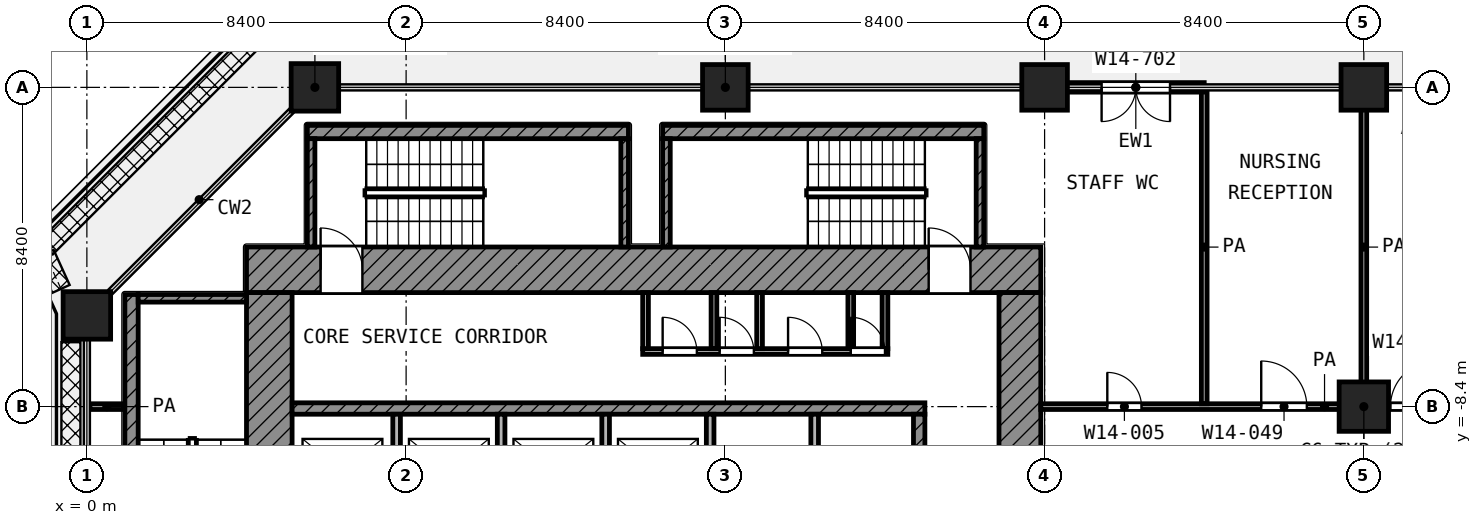
"""IFC4 building model, lengths in metres.
Left out: names, types, materials, properties, quantities, classifications, styles, units other than length and angle.
Written with IfcOpenShell. Run it as: python <this file> out.ifc"""

import sys

from ifc_helpers import new_model, si_unit, direction, frame, frame_2d, origin, origin_2d, place, context, subcontext, project, spatial, rectangle, extrude, element, fill, save


model = new_model("IFC4")
c1 = context("Model", 3, precision=1e-05, world=origin(), true_north=direction((0.0, 1.0)))
c2 = subcontext(c1, "Body", "Model", "MODEL_VIEW")
j1 = project(units=[si_unit("LENGTHUNIT", "METRE"), si_unit("PLANEANGLEUNIT", "RADIAN")], contexts=[c1])
p1 = place(None, origin())
s1 = spatial("IfcSite", under=j1, at=p1, CompositionType="ELEMENT")
p2 = place(p1, origin())
s2 = spatial("IfcBuilding", under=s1, at=p2, CompositionType="ELEMENT")
p3 = place(p2, frame((0.0, 0.0, 64.4)))
s3 = spatial("IfcBuildingStorey", under=s2, at=p3, CompositionType="ELEMENT", Elevation=64.4)
p4 = place(p3, frame((6.0, 0.0, 0.0), z_axis=(0.0, 0.0, 1.0), x_axis=(1.0, 0.0, 0.0)))
e1 = element("IfcColumn", 1, at=p4, inside=s3, PredefinedType="COLUMN", context=c2, shape_type="SweptSolid", body=[
    extrude(rectangle(XDim=1.25, YDim=1.25, at=origin_2d()), origin(), (0.0, 0.0, 1.0), 4.2),
])
for number, where, z_axis, x_axis in (
    (2, (16.8, 0.0, 0.0), (0.0, 0.0, 1.0), (1.0, 0.0, 0.0)),
    (3, (25.2, 0.0, 0.0), (0.0, 0.0, 1.0), (1.0, 0.0, 0.0)),
    (4, (33.6, 0.0, 0.0), (0.0, 0.0, 1.0), (1.0, 0.0, 0.0)),
):
    element("IfcColumn", number, at=place(p3, frame(where, z_axis=z_axis, x_axis=x_axis)), inside=s3, PredefinedType="COLUMN", context=c2, shape_type="SweptSolid", body=[
        extrude(rectangle(XDim=1.2, YDim=1.2, at=origin_2d()), origin(), (0.0, 0.0, 1.0), 4.2),
    ])
p5 = place(p3, frame((0.0, -6.0, 0.0), z_axis=(0.0, 0.0, 1.0), x_axis=(1.0, 0.0, 0.0)))
e5 = element("IfcColumn", 5, at=p5, inside=s3, PredefinedType="COLUMN", context=c2, shape_type="SweptSolid", body=[
    extrude(rectangle(XDim=1.25, YDim=1.25, at=origin_2d()), origin(), (0.0, 0.0, 1.0), 4.2),
])
p6 = place(p3, frame((33.6, -8.4, 0.0), z_axis=(0.0, 0.0, 1.0), x_axis=(1.0, 0.0, 0.0)))
e6 = element("IfcColumn", 6, at=p6, inside=s3, PredefinedType="COLUMN", context=c2, shape_type="SweptSolid", body=[
    extrude(rectangle(XDim=1.3, YDim=1.3, at=origin_2d()), origin(), (0.0, 0.0, 1.0), 4.2),
])
p7 = place(p3, frame((29.4, 0.0, 0.0), z_axis=(0.0, 0.0, 1.0), x_axis=(-1.0, 0.0, 0.0)))
e7 = element("IfcWall", 7, at=p7, inside=s3, PredefinedType="SOLIDWALL", context=c2, shape_type="SweptSolid", body=[
    extrude(rectangle(XDim=3.6, YDim=0.25, at=frame_2d((1.8, 0.0))), origin(), (0.0, 0.0, 1.0), 3.78),
])
p8 = place(p7, frame((0.9, 0.0, 0.0)))
e8 = element("IfcOpeningElement", 8, at=p8, cuts=e7, PredefinedType="OPENING", context=c2, shape_type="SweptSolid", body=[
    extrude(rectangle(XDim=1.8, YDim=2.1, at=frame_2d((0.9, 1.05))), frame((0.0, 0.135, 0.0), z_axis=(0.0, -1.0, 0.0), x_axis=(1.0, 0.0, 0.0)), (0.0, 0.0, 1.0), 0.27),
])
p9 = place(p3, frame((4.2, -4.8, 0.0), z_axis=(0.0, 0.0, 1.0), x_axis=(1.0, 0.0, 0.0)))
e9 = element("IfcWall", 9, at=p9, inside=s3, PredefinedType="SHEAR", context=c2, shape_type="SweptSolid", body=[
    extrude(rectangle(XDim=20.9, YDim=1.2, at=frame_2d((10.45, 0.0))), origin(), (0.0, 0.0, 1.0), 3.9),
])
p10 = place(p9, frame((1.95, 0.0, 0.0)))
e10 = element("IfcOpeningElement", 10, at=p10, cuts=e9, PredefinedType="OPENING", context=c2, shape_type="SweptSolid", body=[
    extrude(rectangle(XDim=1.1, YDim=2.1, at=frame_2d((0.55, 1.05))), frame((0.0, 0.61, 0.0), z_axis=(0.0, -1.0, 0.0), x_axis=(1.0, 0.0, 0.0)), (0.0, 0.0, 1.0), 1.22),
])
p11 = place(p9, frame((17.95, 0.0, 0.0)))
e11 = element("IfcOpeningElement", 11, at=p11, cuts=e9, PredefinedType="OPENING", context=c2, shape_type="SweptSolid", body=[
    extrude(rectangle(XDim=1.1, YDim=2.1, at=frame_2d((0.55, 1.05))), frame((0.0, 0.61, 0.0), z_axis=(0.0, -1.0, 0.0), x_axis=(1.0, 0.0, 0.0)), (0.0, 0.0, 1.0), 1.22),
])
p12 = place(p3, frame((4.8, -25.1, 0.0), z_axis=(0.0, 0.0, 1.0), x_axis=(0.0, 1.0, 0.0)))
e12 = element("IfcWall", 12, at=p12, inside=s3, PredefinedType="SHEAR", context=c2, shape_type="SweptSolid", body=[
    extrude(rectangle(XDim=19.7, YDim=1.2, at=frame_2d((9.85, 0.0))), origin(), (0.0, 0.0, 1.0), 3.9),
])
p13 = place(p12, frame((11.55, 0.0, 0.0)))
e13 = element("IfcOpeningElement", 13, at=p13, cuts=e12, PredefinedType="OPENING", context=c2, shape_type="SweptSolid", body=[
    extrude(rectangle(XDim=1.1, YDim=2.1, at=frame_2d((0.55, 1.05))), frame((0.0, 0.61, 0.0), z_axis=(0.0, -1.0, 0.0), x_axis=(1.0, 0.0, 0.0)), (0.0, 0.0, 1.0), 1.22),
])
p14 = place(p12, frame((2.25, 0.0, 0.0)))
e14 = element("IfcOpeningElement", 14, at=p14, cuts=e12, PredefinedType="OPENING", context=c2, shape_type="SweptSolid", body=[
    extrude(rectangle(XDim=1.1, YDim=2.1, at=frame_2d((0.55, 1.05))), frame((0.0, 0.61, 0.0), z_axis=(0.0, -1.0, 0.0), x_axis=(1.0, 0.0, 0.0)), (0.0, 0.0, 1.0), 1.22),
])
p15 = place(p3, frame((24.55, -24.0, 0.0), z_axis=(0.0, 0.0, 1.0), x_axis=(0.0, 1.0, 0.0)))
e15 = element("IfcWall", 15, at=p15, inside=s3, PredefinedType="SHEAR", context=c2, shape_type="SweptSolid", body=[
    extrude(rectangle(XDim=18.6, YDim=1.1, at=frame_2d((9.3, 0.0))), origin(), (0.0, 0.0, 1.0), 3.9),
])
p16 = place(p15, frame((10.5, 0.0, 0.0)))
e16 = element("IfcOpeningElement", 16, at=p16, cuts=e15, PredefinedType="OPENING", context=c2, shape_type="SweptSolid", body=[
    extrude(rectangle(XDim=1.8, YDim=2.1, at=frame_2d((0.9, 1.05))), frame((0.0, 0.56, 0.0), z_axis=(0.0, -1.0, 0.0), x_axis=(1.0, 0.0, 0.0)), (0.0, 0.0, 1.0), 1.12),
])
p17 = place(p3, frame((5.4, -8.45, 0.0), z_axis=(0.0, 0.0, 1.0), x_axis=(1.0, 0.0, 0.0)))
e17 = element("IfcWall", 17, at=p17, inside=s3, PredefinedType="SHEAR", context=c2, shape_type="SweptSolid", body=[
    extrude(rectangle(XDim=16.65, YDim=0.3, at=frame_2d((8.325, 0.0))), origin(), (0.0, 0.0, 1.0), 3.9),
])
p18 = place(p3, frame((21.9, -10.95, 0.0), z_axis=(0.0, 0.0, 1.0), x_axis=(0.0, 1.0, 0.0)))
e18 = element("IfcWall", 18, at=p18, inside=s3, PredefinedType="SHEAR", context=c2, shape_type="SweptSolid", body=[
    extrude(rectangle(XDim=2.35, YDim=0.3, at=frame_2d((1.175, 0.0))), origin(), (0.0, 0.0, 1.0), 3.9),
])
for number, where, z_axis, x_axis in (
    (19, (8.15, -10.95, 0.0), (0.0, 0.0, 1.0), (0.0, 1.0, 0.0)),
    (20, (10.9, -10.95, 0.0), (0.0, 0.0, 1.0), (0.0, 1.0, 0.0)),
    (21, (13.65, -10.95, 0.0), (0.0, 0.0, 1.0), (0.0, 1.0, 0.0)),
    (22, (16.4, -10.95, 0.0), (0.0, 0.0, 1.0), (0.0, 1.0, 0.0)),
    (23, (19.15, -10.95, 0.0), (0.0, 0.0, 1.0), (0.0, 1.0, 0.0)),
):
    element("IfcWall", number, at=place(p3, frame(where, z_axis=z_axis, x_axis=x_axis)), inside=s3, PredefinedType="PARTITIONING", context=c2, shape_type="SweptSolid", body=[
        extrude(rectangle(XDim=2.35, YDim=0.2, at=frame_2d((1.175, 0.0))), origin(), (0.0, 0.0, 1.0), 3.9),
    ])
p19 = place(p3, frame((14.625, -6.95, 0.0), z_axis=(0.0, 0.0, 1.0), x_axis=(1.0, 0.0, 0.0)))
e24 = element("IfcWall", 24, at=p19, inside=s3, PredefinedType="PARTITIONING", context=c2, shape_type="SweptSolid", body=[
    extrude(rectangle(XDim=6.45, YDim=0.15, at=frame_2d((3.225, 0.0))), origin(), (0.0, 0.0, 1.0), 3.9),
])
p20 = place(p19, frame((0.525, 0.0, 0.0)))
e25 = element("IfcOpeningElement", 25, at=p20, cuts=e24, PredefinedType="OPENING", context=c2, shape_type="SweptSolid", body=[
    extrude(rectangle(XDim=0.9, YDim=2.1, at=frame_2d((0.45, 1.05))), frame((0.0, 0.085, 0.0), z_axis=(0.0, -1.0, 0.0), x_axis=(1.0, 0.0, 0.0)), (0.0, 0.0, 1.0), 0.17),
])
p21 = place(p19, frame((2.025, 0.0, 0.0)))
e26 = element("IfcOpeningElement", 26, at=p21, cuts=e24, PredefinedType="OPENING", context=c2, shape_type="SweptSolid", body=[
    extrude(rectangle(XDim=0.9, YDim=2.1, at=frame_2d((0.45, 1.05))), frame((0.0, 0.085, 0.0), z_axis=(0.0, -1.0, 0.0), x_axis=(1.0, 0.0, 0.0)), (0.0, 0.0, 1.0), 0.17),
])
p22 = place(p19, frame((3.825, 0.0, 0.0)))
e27 = element("IfcOpeningElement", 27, at=p22, cuts=e24, PredefinedType="OPENING", context=c2, shape_type="SweptSolid", body=[
    extrude(rectangle(XDim=0.9, YDim=2.1, at=frame_2d((0.45, 1.05))), frame((0.0, 0.085, 0.0), z_axis=(0.0, -1.0, 0.0), x_axis=(1.0, 0.0, 0.0)), (0.0, 0.0, 1.0), 0.17),
])
p23 = place(p19, frame((5.475, 0.0, 0.0)))
e28 = element("IfcOpeningElement", 28, at=p23, cuts=e24, PredefinedType="OPENING", context=c2, shape_type="SweptSolid", body=[
    extrude(rectangle(XDim=0.9, YDim=2.1, at=frame_2d((0.45, 1.05))), frame((0.0, 0.085, 0.0), z_axis=(0.0, -1.0, 0.0), x_axis=(1.0, 0.0, 0.0)), (0.0, 0.0, 1.0), 0.17),
])
for number, where, z_axis, x_axis in (
    (29, (14.7, -6.875, 0.0), (0.0, 0.0, 1.0), (0.0, 1.0, 0.0)),
    (30, (16.5, -6.875, 0.0), (0.0, 0.0, 1.0), (0.0, 1.0, 0.0)),
    (31, (17.7, -6.875, 0.0), (0.0, 0.0, 1.0), (0.0, 1.0, 0.0)),
    (32, (20.1, -6.875, 0.0), (0.0, 0.0, 1.0), (0.0, 1.0, 0.0)),
    (33, (21.0, -6.875, 0.0), (0.0, 0.0, 1.0), (0.0, 1.0, 0.0)),
):
    element("IfcWall", number, at=place(p3, frame(where, z_axis=z_axis, x_axis=x_axis)), inside=s3, PredefinedType="PARTITIONING", context=c2, shape_type="SweptSolid", body=[
        extrude(rectangle(XDim=1.475, YDim=0.15, at=frame_2d((0.738, 0.0))), origin(), (0.0, 0.0, 1.0), 3.9),
    ])
p24 = place(p3, frame((1.175, -13.9, 0.0), z_axis=(0.0, 0.0, 1.0), x_axis=(0.0, 1.0, 0.0)))
e34 = element("IfcWall", 34, at=p24, inside=s3, PredefinedType="SHEAR", context=c2, shape_type="SweptSolid", body=[
    extrude(rectangle(XDim=8.45, YDim=0.35, at=frame_2d((4.225, 0.0))), origin(), (0.0, 0.0, 1.0), 3.9),
])
p25 = place(p3, frame((1.35, -5.55, 0.0), z_axis=(0.0, 0.0, 1.0), x_axis=(1.0, 0.0, 0.0)))
e35 = element("IfcWall", 35, at=p25, inside=s3, PredefinedType="SHEAR", context=c2, shape_type="SweptSolid", body=[
    extrude(rectangle(XDim=2.85, YDim=0.2, at=frame_2d((1.425, 0.0))), origin(), (0.0, 0.0, 1.0), 3.9),
])
p26 = place(p3, frame((5.8, -1.175, 0.0), z_axis=(0.0, 0.0, 1.0), x_axis=(1.0, 0.0, 0.0)))
e36 = element("IfcWall", 36, at=p26, inside=s3, PredefinedType="SHEAR", context=c2, shape_type="SweptSolid", body=[
    extrude(rectangle(XDim=8.45, YDim=0.35, at=frame_2d((4.225, 0.0))), origin(), (0.0, 0.0, 1.0), 3.9),
])
for number, where, z_axis, x_axis in (
    (37, (5.9, -4.2, 0.0), (0.0, 0.0, 1.0), (0.0, 1.0, 0.0)),
    (38, (14.15, -4.2, 0.0), (0.0, 0.0, 1.0), (0.0, 1.0, 0.0)),
):
    element("IfcWall", number, at=place(p3, frame(where, z_axis=z_axis, x_axis=x_axis)), inside=s3, PredefinedType="SHEAR", context=c2, shape_type="SweptSolid", body=[
        extrude(rectangle(XDim=2.85, YDim=0.2, at=frame_2d((1.425, 0.0))), origin(), (0.0, 0.0, 1.0), 3.9),
    ])
p27 = place(p3, frame((15.15, -1.175, 0.0), z_axis=(0.0, 0.0, 1.0), x_axis=(1.0, 0.0, 0.0)))
e39 = element("IfcWall", 39, at=p27, inside=s3, PredefinedType="SHEAR", context=c2, shape_type="SweptSolid", body=[
    extrude(rectangle(XDim=8.45, YDim=0.35, at=frame_2d((4.225, 0.0))), origin(), (0.0, 0.0, 1.0), 3.9),
])
for number, where, z_axis, x_axis in (
    (40, (15.25, -4.2, 0.0), (0.0, 0.0, 1.0), (0.0, 1.0, 0.0)),
    (41, (23.5, -4.2, 0.0), (0.0, 0.0, 1.0), (0.0, 1.0, 0.0)),
):
    element("IfcWall", number, at=place(p3, frame(where, z_axis=z_axis, x_axis=x_axis)), inside=s3, PredefinedType="SHEAR", context=c2, shape_type="SweptSolid", body=[
        extrude(rectangle(XDim=2.85, YDim=0.2, at=frame_2d((1.425, 0.0))), origin(), (0.0, 0.0, 1.0), 3.9),
    ])
p28 = place(p3, frame((0.08, -8.4, 0.0), z_axis=(0.0, 0.0, 1.0), x_axis=(1.0, 0.0, 0.0)))
e42 = element("IfcWall", 42, at=p28, inside=s3, PredefinedType="PARTITIONING", context=c2, shape_type="SweptSolid", body=[
    extrude(rectangle(XDim=0.89, YDim=0.15, at=frame_2d((0.445, 0.0))), origin(), (0.0, 0.0, 1.0), 3.9),
])
p29 = place(p3, frame((25.1, -8.4, 0.0), z_axis=(0.0, 0.0, 1.0), x_axis=(1.0, 0.0, 0.0)))
e43 = element("IfcWall", 43, at=p29, inside=s3, PredefinedType="PARTITIONING", context=c2, shape_type="SweptSolid", body=[
    extrude(rectangle(XDim=14.932, YDim=0.15, at=frame_2d((7.466, 0.0))), origin(), (0.0, 0.0, 1.0), 3.9),
])
p30 = place(p29, frame((1.75, 0.0, 0.0)))
e44 = element("IfcOpeningElement", 44, at=p30, cuts=e43, PredefinedType="OPENING", context=c2, shape_type="SweptSolid", body=[
    extrude(rectangle(XDim=0.9, YDim=2.1, at=frame_2d((0.45, 1.05))), frame((0.0, 0.085, 0.0), z_axis=(0.0, -1.0, 0.0), x_axis=(1.0, 0.0, 0.0)), (0.0, 0.0, 1.0), 0.17),
])
p31 = place(p29, frame((5.8, 0.0, 0.0)))
e45 = element("IfcOpeningElement", 45, at=p31, cuts=e43, PredefinedType="OPENING", context=c2, shape_type="SweptSolid", body=[
    extrude(rectangle(XDim=1.2, YDim=2.1, at=frame_2d((0.6, 1.05))), frame((0.0, 0.085, 0.0), z_axis=(0.0, -1.0, 0.0), x_axis=(1.0, 0.0, 0.0)), (0.0, 0.0, 1.0), 0.17),
])
p32 = place(p29, frame((9.2, 0.0, 0.0)))
e46 = element("IfcOpeningElement", 46, at=p32, cuts=e43, PredefinedType="OPENING", context=c2, shape_type="SweptSolid", body=[
    extrude(rectangle(XDim=1.2, YDim=2.1, at=frame_2d((0.6, 1.05))), frame((0.0, 0.085, 0.0), z_axis=(0.0, -1.0, 0.0), x_axis=(1.0, 0.0, 0.0)), (0.0, 0.0, 1.0), 0.17),
])
for number, where, z_axis, x_axis in (
    (47, (29.4, -8.325, 0.0), (0.0, 0.0, 1.0), (0.0, 1.0, 0.0)),
    (48, (33.6, -8.325, 0.0), (0.0, 0.0, 1.0), (0.0, 1.0, 0.0)),
):
    element("IfcWall", number, at=place(p3, frame(where, z_axis=z_axis, x_axis=x_axis)), inside=s3, PredefinedType="PARTITIONING", context=c2, shape_type="SweptSolid", body=[
        extrude(rectangle(XDim=8.245, YDim=0.15, at=frame_2d((4.123, 0.0))), origin(), (0.0, 0.0, 1.0), 3.9),
    ])
p33 = place(p8, origin())
e49 = element("IfcDoor", 49, at=p33, inside=s3, OperationType="DOUBLE_DOOR_SINGLE_SWING", PredefinedType="DOOR", context=c2, shape_type="SweptSolid", body=[
    extrude(rectangle(XDim=1.8, YDim=2.1, at=frame_2d((0.9, 1.05))), frame((0.0, 0.025, 0.0), z_axis=(0.0, -1.0, 0.0), x_axis=(1.0, 0.0, 0.0)), (0.0, 0.0, 1.0), 0.05),
])
fill(e8, e49)
p34 = place(p10, origin())
e50 = element("IfcDoor", 50, at=p34, inside=s3, OperationType="SINGLE_SWING_LEFT", PredefinedType="DOOR", context=c2, shape_type="SweptSolid", body=[
    extrude(rectangle(XDim=1.1, YDim=2.1, at=frame_2d((0.55, 1.05))), frame((0.0, 0.025, 0.0), z_axis=(0.0, -1.0, 0.0), x_axis=(1.0, 0.0, 0.0)), (0.0, 0.0, 1.0), 0.05),
])
fill(e10, e50)
p35 = place(p11, origin())
e51 = element("IfcDoor", 51, at=p35, inside=s3, OperationType="SINGLE_SWING_LEFT", PredefinedType="DOOR", context=c2, shape_type="SweptSolid", body=[
    extrude(rectangle(XDim=1.1, YDim=2.1, at=frame_2d((0.55, 1.05))), frame((0.0, 0.025, 0.0), z_axis=(0.0, -1.0, 0.0), x_axis=(1.0, 0.0, 0.0)), (0.0, 0.0, 1.0), 0.05),
])
fill(e11, e51)
p36 = place(p20, origin())
e52 = element("IfcDoor", 52, at=p36, inside=s3, OperationType="SINGLE_SWING_LEFT", PredefinedType="DOOR", context=c2, shape_type="SweptSolid", body=[
    extrude(rectangle(XDim=0.9, YDim=2.1, at=frame_2d((0.45, 1.05))), frame((0.0, 0.025, 0.0), z_axis=(0.0, -1.0, 0.0), x_axis=(1.0, 0.0, 0.0)), (0.0, 0.0, 1.0), 0.05),
])
fill(e25, e52)
p37 = place(p21, origin())
e53 = element("IfcDoor", 53, at=p37, inside=s3, OperationType="SINGLE_SWING_LEFT", PredefinedType="DOOR", context=c2, shape_type="SweptSolid", body=[
    extrude(rectangle(XDim=0.9, YDim=2.1, at=frame_2d((0.45, 1.05))), frame((0.0, 0.025, 0.0), z_axis=(0.0, -1.0, 0.0), x_axis=(1.0, 0.0, 0.0)), (0.0, 0.0, 1.0), 0.05),
])
fill(e26, e53)
p38 = place(p22, origin())
e54 = element("IfcDoor", 54, at=p38, inside=s3, OperationType="SINGLE_SWING_LEFT", PredefinedType="DOOR", context=c2, shape_type="SweptSolid", body=[
    extrude(rectangle(XDim=0.9, YDim=2.1, at=frame_2d((0.45, 1.05))), frame((0.0, 0.025, 0.0), z_axis=(0.0, -1.0, 0.0), x_axis=(1.0, 0.0, 0.0)), (0.0, 0.0, 1.0), 0.05),
])
fill(e27, e54)
p39 = place(p23, origin())
e55 = element("IfcDoor", 55, at=p39, inside=s3, OperationType="SINGLE_SWING_LEFT", PredefinedType="DOOR", context=c2, shape_type="SweptSolid", body=[
    extrude(rectangle(XDim=0.9, YDim=2.1, at=frame_2d((0.45, 1.05))), frame((0.0, 0.025, 0.0), z_axis=(0.0, -1.0, 0.0), x_axis=(1.0, 0.0, 0.0)), (0.0, 0.0, 1.0), 0.05),
])
fill(e28, e55)
p40 = place(p30, origin())
e56 = element("IfcDoor", 56, at=p40, inside=s3, OperationType="SINGLE_SWING_LEFT", PredefinedType="DOOR", context=c2, shape_type="SweptSolid", body=[
    extrude(rectangle(XDim=0.9, YDim=2.1, at=frame_2d((0.45, 1.05))), frame((0.0, 0.025, 0.0), z_axis=(0.0, -1.0, 0.0), x_axis=(1.0, 0.0, 0.0)), (0.0, 0.0, 1.0), 0.05),
])
fill(e44, e56)
p41 = place(p31, origin())
e57 = element("IfcDoor", 57, at=p41, inside=s3, OperationType="SINGLE_SWING_LEFT", PredefinedType="DOOR", context=c2, shape_type="SweptSolid", body=[
    extrude(rectangle(XDim=1.2, YDim=2.1, at=frame_2d((0.6, 1.05))), frame((0.0, 0.025, 0.0), z_axis=(0.0, -1.0, 0.0), x_axis=(1.0, 0.0, 0.0)), (0.0, 0.0, 1.0), 0.05),
])
fill(e45, e57)
p42 = place(p32, origin())
e58 = element("IfcDoor", 58, at=p42, inside=s3, OperationType="SINGLE_SWING_RIGHT", PredefinedType="DOOR", context=c2, shape_type="SweptSolid", body=[
    extrude(rectangle(XDim=1.2, YDim=2.1, at=frame_2d((0.6, 1.05))), frame((0.0, 0.025, 0.0), z_axis=(0.0, -1.0, 0.0), x_axis=(1.0, 0.0, 0.0)), (0.0, 0.0, 1.0), 0.05),
])
fill(e46, e58)
save(model, sys.argv[1])
